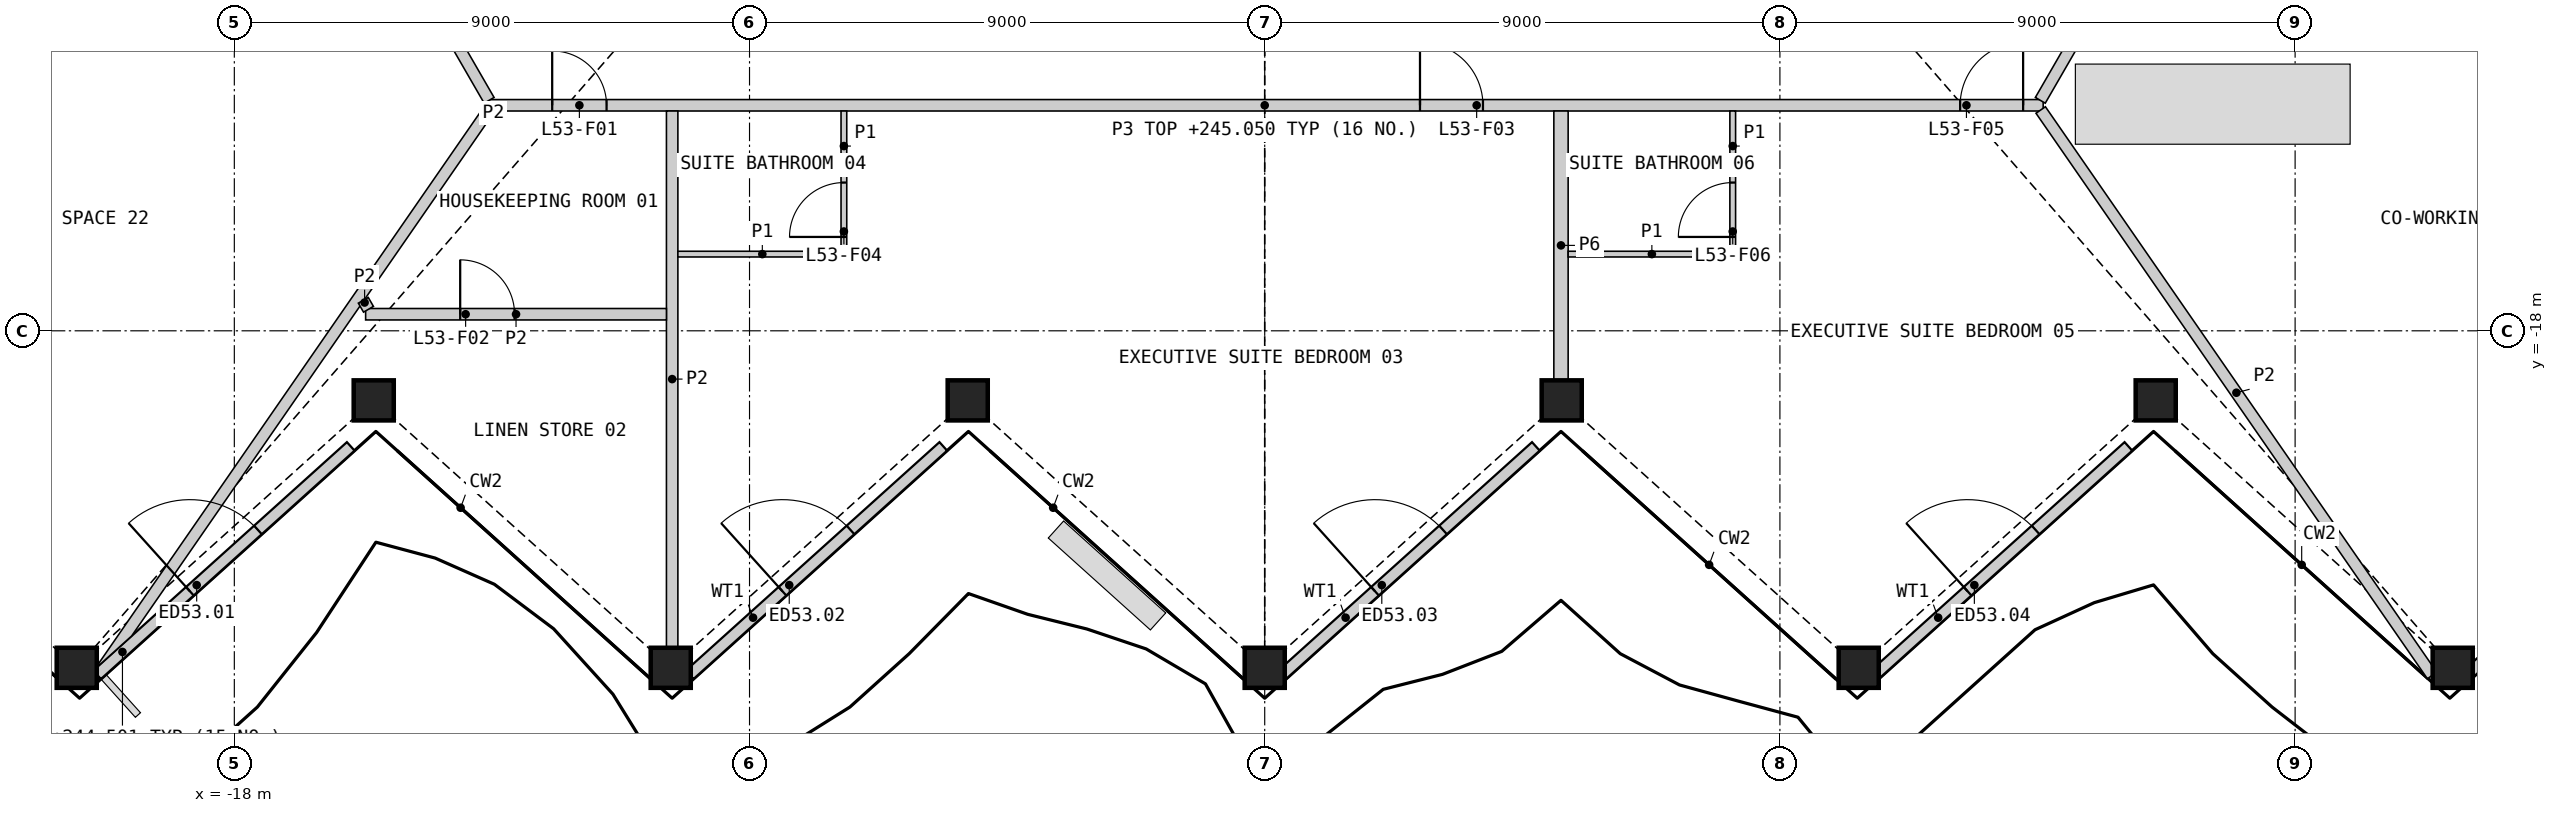
"""IFC4 building model, lengths in metres.
Left out: names, types, materials, properties, quantities, classifications, styles, units other than length and angle.
Written with IfcOpenShell. Run it as: python <this file> out.ifc"""

import sys

from ifc_helpers import new_model, si_unit, direction, frame, frame_2d, origin, origin_2d, place, context, subcontext, project, spatial, polyline, rectangle, hollow_rectangle, outline, extrude, element, fill, save


model = new_model("IFC4")
c1 = context("Model", 3, precision=1e-05, world=origin(), true_north=direction((0.0, 1.0)))
c2 = subcontext(c1, "Body", "Model", "MODEL_VIEW")
j1 = project(units=[si_unit("LENGTHUNIT", "METRE"), si_unit("PLANEANGLEUNIT", "RADIAN")], contexts=[c1])
p1 = place(None, origin())
s1 = spatial("IfcSite", under=j1, at=p1, CompositionType="ELEMENT")
p2 = place(p1, origin())
s2 = spatial("IfcBuilding", under=s1, at=p2, CompositionType="ELEMENT")
p3 = place(p2, frame((0.0, 0.0, 241.8)))
s3 = spatial("IfcBuildingStorey", under=s2, at=p3, CompositionType="ELEMENT", Elevation=241.8)
for number, where, z_axis, x_axis in (
    (1, (-20.753, -23.887, 0.0), (0.0, 0.0, 1.0), (1.0, 0.0, 0.0)),
    (2, (-15.565, -19.215, 0.0), (0.0, 0.0, 1.0), (1.0, 0.0, 0.0)),
    (3, (-10.376, -23.887, 0.0), (0.0, 0.0, 1.0), (1.0, 0.0, 0.0)),
    (4, (-5.188, -19.215, 0.0), (0.0, 0.0, 1.0), (1.0, 0.0, 0.0)),
    (5, (0.0, -23.887, 0.0), (0.0, 0.0, 1.0), (1.0, 0.0, 0.0)),
    (6, (5.188, -19.215, 0.0), (0.0, 0.0, 1.0), (1.0, 0.0, 0.0)),
    (7, (10.376, -23.887, 0.0), (0.0, 0.0, 1.0), (1.0, 0.0, 0.0)),
    (8, (15.565, -19.215, 0.0), (0.0, 0.0, 1.0), (1.0, 0.0, 0.0)),
    (9, (20.753, -23.887, 0.0), (0.0, 0.0, 1.0), (1.0, 0.0, 0.0)),
):
    element("IfcColumn", number, at=place(p3, frame(where, z_axis=z_axis, x_axis=x_axis)), inside=s3, PredefinedType="COLUMN", context=c2, shape_type="SweptSolid", body=[
        extrude(hollow_rectangle(XDim=0.7, YDim=0.7, WallThickness=0.045, at=origin_2d()), origin(), (0.0, 0.0, 1.0), 3.6),
    ])
p4 = place(p3, frame((-20.397, -24.009, 0.0), z_axis=(0.0, 0.0, 1.0), x_axis=(0.74315161366, 0.669123067241, 0.0)))
e10 = element("IfcWall", 10, at=p4, inside=s3, PredefinedType="SOLIDWALL", context=c2, shape_type="SweptSolid", body=[
    extrude(rectangle(XDim=5.963, YDim=0.2, at=frame_2d((2.981, 0.0))), origin(), (0.0, 0.0, 1.0), 2.701),
])
p5 = place(p4, frame((2.181, 0.0, 0.0)))
e11 = element("IfcOpeningElement", 11, at=p5, cuts=e10, PredefinedType="OPENING", context=c2, shape_type="SweptSolid", body=[
    extrude(rectangle(XDim=1.6, YDim=2.4, at=frame_2d((0.8, 1.2))), frame((0.0, 0.11, 0.0), z_axis=(0.0, -1.0, 0.0), x_axis=(1.0, 0.0, 0.0)), (0.0, 0.0, 1.0), 0.22),
])
p6 = place(p3, frame((-10.046, -24.009, 0.0), z_axis=(0.0, 0.0, 1.0), x_axis=(0.743133280699, 0.669143427912, 0.0)))
e12 = element("IfcWall", 12, at=p6, inside=s3, PredefinedType="SOLIDWALL", context=c2, shape_type="SweptSolid", body=[
    extrude(rectangle(XDim=5.962, YDim=0.2, at=frame_2d((2.981, 0.0))), origin(), (0.0, 0.0, 1.0), 2.701),
])
p7 = place(p6, frame((2.181, 0.0, 0.0)))
e13 = element("IfcOpeningElement", 13, at=p7, cuts=e12, PredefinedType="OPENING", context=c2, shape_type="SweptSolid", body=[
    extrude(rectangle(XDim=1.6, YDim=2.4, at=frame_2d((0.8, 1.2))), frame((0.0, 0.11, 0.0), z_axis=(0.0, -1.0, 0.0), x_axis=(1.0, 0.0, 0.0)), (0.0, 0.0, 1.0), 0.22),
])
p8 = place(p3, frame((0.305, -24.009, 0.0), z_axis=(0.0, 0.0, 1.0), x_axis=(0.74315161366, 0.669123067241, 0.0)))
e14 = element("IfcWall", 14, at=p8, inside=s3, PredefinedType="SOLIDWALL", context=c2, shape_type="SweptSolid", body=[
    extrude(rectangle(XDim=5.963, YDim=0.2, at=frame_2d((2.981, 0.0))), origin(), (0.0, 0.0, 1.0), 2.701),
])
p9 = place(p8, frame((2.181, 0.0, 0.0)))
e15 = element("IfcOpeningElement", 15, at=p9, cuts=e14, PredefinedType="OPENING", context=c2, shape_type="SweptSolid", body=[
    extrude(rectangle(XDim=1.6, YDim=2.4, at=frame_2d((0.8, 1.2))), frame((0.0, 0.11, 0.0), z_axis=(0.0, -1.0, 0.0), x_axis=(1.0, 0.0, 0.0)), (0.0, 0.0, 1.0), 0.22),
])
p10 = place(p3, frame((10.657, -24.009, 0.0), z_axis=(0.0, 0.0, 1.0), x_axis=(0.74315161366, 0.669123067241, 0.0)))
e16 = element("IfcWall", 16, at=p10, inside=s3, PredefinedType="SOLIDWALL", context=c2, shape_type="SweptSolid", body=[
    extrude(rectangle(XDim=5.963, YDim=0.2, at=frame_2d((2.981, 0.0))), origin(), (0.0, 0.0, 1.0), 2.701),
])
p11 = place(p10, frame((2.181, 0.0, 0.0)))
e17 = element("IfcOpeningElement", 17, at=p11, cuts=e16, PredefinedType="OPENING", context=c2, shape_type="SweptSolid", body=[
    extrude(rectangle(XDim=1.6, YDim=2.4, at=frame_2d((0.8, 1.2))), frame((0.0, 0.11, 0.0), z_axis=(0.0, -1.0, 0.0), x_axis=(1.0, 0.0, 0.0)), (0.0, 0.0, 1.0), 0.22),
])
p12 = place(p3, frame((21.008, -24.009, 0.0), z_axis=(0.0, 0.0, 1.0), x_axis=(0.743133280699, 0.669143427912, 0.0)))
e18 = element("IfcWall", 18, at=p12, inside=s3, PredefinedType="SOLIDWALL", context=c2, shape_type="SweptSolid", body=[
    extrude(rectangle(XDim=5.962, YDim=0.2, at=frame_2d((2.981, 0.0))), origin(), (0.0, 0.0, 1.0), 2.701),
])
p13 = place(p12, frame((2.181, 0.0, 0.0)))
e19 = element("IfcOpeningElement", 19, at=p13, cuts=e18, PredefinedType="OPENING", context=c2, shape_type="SweptSolid", body=[
    extrude(rectangle(XDim=1.6, YDim=2.4, at=frame_2d((0.8, 1.2))), frame((0.0, 0.11, 0.0), z_axis=(0.0, -1.0, 0.0), x_axis=(1.0, 0.0, 0.0)), (0.0, 0.0, 1.0), 0.22),
])
p14 = place(p3, frame((-13.599, -14.06, 0.0), z_axis=(0.0, 0.0, 1.0), x_axis=(1.0, 0.0, 0.0)))
e20 = element("IfcWall", 20, at=p14, inside=s3, PredefinedType="PARTITIONING", context=c2, shape_type="SweptSolid", body=[
    extrude(rectangle(XDim=27.198, YDim=0.2, at=frame_2d((13.599, 0.0))), origin(), (0.0, 0.0, 1.0), 3.25),
])
p15 = place(p14, frame((1.152, 0.0, 0.0)))
e21 = element("IfcOpeningElement", 21, at=p15, cuts=e20, PredefinedType="OPENING", context=c2, shape_type="SweptSolid", body=[
    extrude(rectangle(XDim=0.95, YDim=2.1, at=frame_2d((0.475, 1.05))), frame((0.0, 0.11, 0.0), z_axis=(0.0, -1.0, 0.0), x_axis=(1.0, 0.0, 0.0)), (0.0, 0.0, 1.0), 0.22),
])
p16 = place(p14, frame((16.311, 0.0, 0.0)))
e22 = element("IfcOpeningElement", 22, at=p16, cuts=e20, PredefinedType="OPENING", context=c2, shape_type="SweptSolid", body=[
    extrude(rectangle(XDim=1.1, YDim=2.1, at=frame_2d((0.55, 1.05))), frame((0.0, 0.11, 0.0), z_axis=(0.0, -1.0, 0.0), x_axis=(1.0, 0.0, 0.0)), (0.0, 0.0, 1.0), 0.22),
])
p17 = place(p14, frame((25.747, 0.0, 0.0)))
e23 = element("IfcOpeningElement", 23, at=p17, cuts=e20, PredefinedType="OPENING", context=c2, shape_type="SweptSolid", body=[
    extrude(rectangle(XDim=1.1, YDim=2.1, at=frame_2d((0.55, 1.05))), frame((0.0, 0.11, 0.0), z_axis=(0.0, -1.0, 0.0), x_axis=(1.0, 0.0, 0.0)), (0.0, 0.0, 1.0), 0.22),
])
p18 = place(p3, frame((5.176, -18.855, 0.0), z_axis=(0.0, 0.0, 1.0), x_axis=(0.0, 1.0, 0.0)))
e24 = element("IfcWall", 24, at=p18, inside=s3, PredefinedType="PARTITIONING", context=c2, shape_type="SweptSolid", body=[
    extrude(rectangle(XDim=4.695, YDim=0.25, at=frame_2d((2.348, 0.0))), origin(), (0.0, 0.0, 1.0), 2.404),
])
for number, where, z_axis, x_axis in (
    (25, (13.549, -13.974, 0.0), (0.0, 0.0, 1.0), (0.5, 0.866, 0.0)),
    (26, (-15.05, -11.374, 0.0), (0.0, 0.0, 1.0), (0.5, -0.866, 0.0)),
):
    element("IfcWall", number, at=place(p3, frame(where, z_axis=z_axis, x_axis=x_axis)), inside=s3, PredefinedType="PARTITIONING", context=c2, shape_type="SweptSolid", body=[
        extrude(rectangle(XDim=3.002, YDim=0.2, at=frame_2d((1.501, 0.0))), origin(), (0.0, 0.0, 1.0), 3.25),
    ])
p19 = place(p3, origin())
e27 = element("IfcWall", 27, at=p19, inside=s3, PredefinedType="PARTITIONING", context=c2, shape_type="SweptSolid", body=[
    extrude(outline(polyline([(-13.473, -14.199), (-19.794, -23.331), (-20.439, -23.912), (-13.638, -14.086), (-13.473, -14.199)])), origin(), (0.0, 0.0, 1.0), 2.404),
])
p20 = place(p3, frame((13.556, -14.143, 0.0), z_axis=(0.0, 0.0, 1.0), x_axis=(0.56913494803, -0.82224413098, 0.0)))
e28 = element("IfcWall", 28, at=p20, inside=s3, PredefinedType="PARTITIONING", context=c2, shape_type="SweptSolid", body=[
    extrude(rectangle(XDim=12.014, YDim=0.2, at=frame_2d((6.007, 0.0))), origin(), (0.0, 0.0, 1.0), 2.404),
])
p21 = place(p3, frame((-10.351, -23.527, 0.0), z_axis=(0.0, 0.0, 1.0), x_axis=(0.0, 1.0, 0.0)))
e29 = element("IfcWall", 29, at=p21, inside=s3, PredefinedType="PARTITIONING", context=c2, shape_type="SweptSolid", body=[
    extrude(rectangle(XDim=9.366, YDim=0.2, at=frame_2d((4.683, 0.0))), origin(), (0.0, 0.0, 1.0), 2.404),
])
p22 = place(p3, frame((-15.706, -17.71, 0.0), z_axis=(0.0, 0.0, 1.0), x_axis=(1.0, 0.0, 0.0)))
e30 = element("IfcWall", 30, at=p22, inside=s3, PredefinedType="PARTITIONING", context=c2, shape_type="SweptSolid", body=[
    extrude(rectangle(XDim=5.255, YDim=0.2, at=frame_2d((2.627, 0.0))), origin(), (0.0, 0.0, 1.0), 2.404),
])
p23 = place(p22, frame((1.652, 0.0, 0.0)))
e31 = element("IfcOpeningElement", 31, at=p23, cuts=e30, PredefinedType="OPENING", context=c2, shape_type="SweptSolid", body=[
    extrude(rectangle(XDim=0.95, YDim=2.1, at=frame_2d((0.475, 1.05))), frame((0.0, 0.11, 0.0), z_axis=(0.0, -1.0, 0.0), x_axis=(1.0, 0.0, 0.0)), (0.0, 0.0, 1.0), 0.22),
])
p24 = place(p3, frame((-15.747, -17.467, 0.0), z_axis=(0.0, 0.0, 1.0), x_axis=(0.498749683645, -0.866746071848, 0.0)))
e32 = element("IfcWall", 32, at=p24, inside=s3, PredefinedType="PARTITIONING", context=c2, shape_type="SweptSolid", body=[
    extrude(rectangle(XDim=0.181, YDim=0.2, at=frame_2d((0.091, 0.0))), origin(), (0.0, 0.0, 1.0), 2.404),
])
p25 = place(p3, frame((-10.251, -16.66, 0.0), z_axis=(0.0, 0.0, 1.0), x_axis=(1.0, 0.0, 0.0)))
e33 = element("IfcWall", 33, at=p25, inside=s3, PredefinedType="PARTITIONING", context=c2, shape_type="SweptSolid", body=[
    extrude(rectangle(XDim=2.95, YDim=0.1, at=frame_2d((1.475, 0.0))), origin(), (0.0, 0.0, 1.0), 2.404),
])
p26 = place(p3, frame((5.301, -16.66, 0.0), z_axis=(0.0, 0.0, 1.0), x_axis=(1.0, 0.0, 0.0)))
e34 = element("IfcWall", 34, at=p26, inside=s3, PredefinedType="PARTITIONING", context=c2, shape_type="SweptSolid", body=[
    extrude(rectangle(XDim=2.925, YDim=0.1, at=frame_2d((1.462, 0.0))), origin(), (0.0, 0.0, 1.0), 2.404),
])
p27 = place(p3, frame((-7.351, -16.61, 0.0), z_axis=(0.0, 0.0, 1.0), x_axis=(0.0, 1.0, 0.0)))
e35 = element("IfcWall", 35, at=p27, inside=s3, PredefinedType="PARTITIONING", context=c2, shape_type="SweptSolid", body=[
    extrude(rectangle(XDim=2.45, YDim=0.1, at=frame_2d((1.225, 0.0))), origin(), (0.0, 0.0, 1.0), 2.404),
])
p28 = place(p27, frame((0.25, 0.0, 0.0)))
e36 = element("IfcOpeningElement", 36, at=p28, cuts=e35, PredefinedType="OPENING", context=c2, shape_type="SweptSolid", body=[
    extrude(rectangle(XDim=0.95, YDim=2.1, at=frame_2d((0.475, 1.05))), frame((0.0, 0.06, 0.0), z_axis=(0.0, -1.0, 0.0), x_axis=(1.0, 0.0, 0.0)), (0.0, 0.0, 1.0), 0.12),
])
p29 = place(p3, frame((8.176, -16.61, 0.0), z_axis=(0.0, 0.0, 1.0), x_axis=(0.0, 1.0, 0.0)))
e37 = element("IfcWall", 37, at=p29, inside=s3, PredefinedType="PARTITIONING", context=c2, shape_type="SweptSolid", body=[
    extrude(rectangle(XDim=2.45, YDim=0.1, at=frame_2d((1.225, 0.0))), origin(), (0.0, 0.0, 1.0), 2.404),
])
p30 = place(p29, frame((0.25, 0.0, 0.0)))
e38 = element("IfcOpeningElement", 38, at=p30, cuts=e37, PredefinedType="OPENING", context=c2, shape_type="SweptSolid", body=[
    extrude(rectangle(XDim=0.95, YDim=2.1, at=frame_2d((0.475, 1.05))), frame((0.0, 0.06, 0.0), z_axis=(0.0, -1.0, 0.0), x_axis=(1.0, 0.0, 0.0)), (0.0, 0.0, 1.0), 0.12),
])
p31 = place(p5, origin())
e39 = element("IfcDoor", 39, at=p31, inside=s3, OperationType="DOUBLE_DOOR_SINGLE_SWING", PredefinedType="DOOR", context=c2, shape_type="SweptSolid", body=[
    extrude(rectangle(XDim=1.6, YDim=2.4, at=frame_2d((0.8, 1.2))), frame((0.0, 0.025, 0.0), z_axis=(0.0, -1.0, 0.0), x_axis=(1.0, 0.0, 0.0)), (0.0, 0.0, 1.0), 0.05),
])
fill(e11, e39)
p32 = place(p7, origin())
e40 = element("IfcDoor", 40, at=p32, inside=s3, OperationType="DOUBLE_DOOR_SINGLE_SWING", PredefinedType="DOOR", context=c2, shape_type="SweptSolid", body=[
    extrude(rectangle(XDim=1.6, YDim=2.4, at=frame_2d((0.8, 1.2))), frame((0.0, 0.025, 0.0), z_axis=(0.0, -1.0, 0.0), x_axis=(1.0, 0.0, 0.0)), (0.0, 0.0, 1.0), 0.05),
])
fill(e13, e40)
p33 = place(p9, origin())
e41 = element("IfcDoor", 41, at=p33, inside=s3, OperationType="DOUBLE_DOOR_SINGLE_SWING", PredefinedType="DOOR", context=c2, shape_type="SweptSolid", body=[
    extrude(rectangle(XDim=1.6, YDim=2.4, at=frame_2d((0.8, 1.2))), frame((0.0, 0.025, 0.0), z_axis=(0.0, -1.0, 0.0), x_axis=(1.0, 0.0, 0.0)), (0.0, 0.0, 1.0), 0.05),
])
fill(e15, e41)
p34 = place(p11, origin())
e42 = element("IfcDoor", 42, at=p34, inside=s3, OperationType="DOUBLE_DOOR_SINGLE_SWING", PredefinedType="DOOR", context=c2, shape_type="SweptSolid", body=[
    extrude(rectangle(XDim=1.6, YDim=2.4, at=frame_2d((0.8, 1.2))), frame((0.0, 0.025, 0.0), z_axis=(0.0, -1.0, 0.0), x_axis=(1.0, 0.0, 0.0)), (0.0, 0.0, 1.0), 0.05),
])
fill(e17, e42)
p35 = place(p15, origin())
e43 = element("IfcDoor", 43, at=p35, inside=s3, OperationType="SINGLE_SWING_LEFT", PredefinedType="DOOR", context=c2, shape_type="SweptSolid", body=[
    extrude(rectangle(XDim=0.95, YDim=2.1, at=frame_2d((0.475, 1.05))), frame((0.0, 0.025, 0.0), z_axis=(0.0, -1.0, 0.0), x_axis=(1.0, 0.0, 0.0)), (0.0, 0.0, 1.0), 0.05),
])
fill(e21, e43)
p36 = place(p23, origin())
e44 = element("IfcDoor", 44, at=p36, inside=s3, OperationType="SINGLE_SWING_LEFT", PredefinedType="DOOR", context=c2, shape_type="SweptSolid", body=[
    extrude(rectangle(XDim=0.95, YDim=2.1, at=frame_2d((0.475, 1.05))), frame((0.0, 0.025, 0.0), z_axis=(0.0, -1.0, 0.0), x_axis=(1.0, 0.0, 0.0)), (0.0, 0.0, 1.0), 0.05),
])
fill(e31, e44)
p37 = place(p16, origin())
e45 = element("IfcDoor", 45, at=p37, inside=s3, OperationType="SINGLE_SWING_LEFT", PredefinedType="DOOR", context=c2, shape_type="SweptSolid", body=[
    extrude(rectangle(XDim=1.1, YDim=2.1, at=frame_2d((0.55, 1.05))), frame((0.0, 0.025, 0.0), z_axis=(0.0, -1.0, 0.0), x_axis=(1.0, 0.0, 0.0)), (0.0, 0.0, 1.0), 0.05),
])
fill(e22, e45)
p38 = place(p28, origin())
e46 = element("IfcDoor", 46, at=p38, inside=s3, OperationType="SINGLE_SWING_LEFT", PredefinedType="DOOR", context=c2, shape_type="SweptSolid", body=[
    extrude(rectangle(XDim=0.95, YDim=2.1, at=frame_2d((0.475, 1.05))), frame((0.0, 0.025, 0.0), z_axis=(0.0, -1.0, 0.0), x_axis=(1.0, 0.0, 0.0)), (0.0, 0.0, 1.0), 0.05),
])
fill(e36, e46)
p39 = place(p17, origin())
e47 = element("IfcDoor", 47, at=p39, inside=s3, OperationType="SINGLE_SWING_RIGHT", PredefinedType="DOOR", context=c2, shape_type="SweptSolid", body=[
    extrude(rectangle(XDim=1.1, YDim=2.1, at=frame_2d((0.55, 1.05))), frame((0.0, 0.025, 0.0), z_axis=(0.0, -1.0, 0.0), x_axis=(1.0, 0.0, 0.0)), (0.0, 0.0, 1.0), 0.05),
])
fill(e23, e47)
p40 = place(p30, origin())
e48 = element("IfcDoor", 48, at=p40, inside=s3, OperationType="SINGLE_SWING_LEFT", PredefinedType="DOOR", context=c2, shape_type="SweptSolid", body=[
    extrude(rectangle(XDim=0.95, YDim=2.1, at=frame_2d((0.475, 1.05))), frame((0.0, 0.025, 0.0), z_axis=(0.0, -1.0, 0.0), x_axis=(1.0, 0.0, 0.0)), (0.0, 0.0, 1.0), 0.05),
])
fill(e38, e48)
save(model, sys.argv[1])
